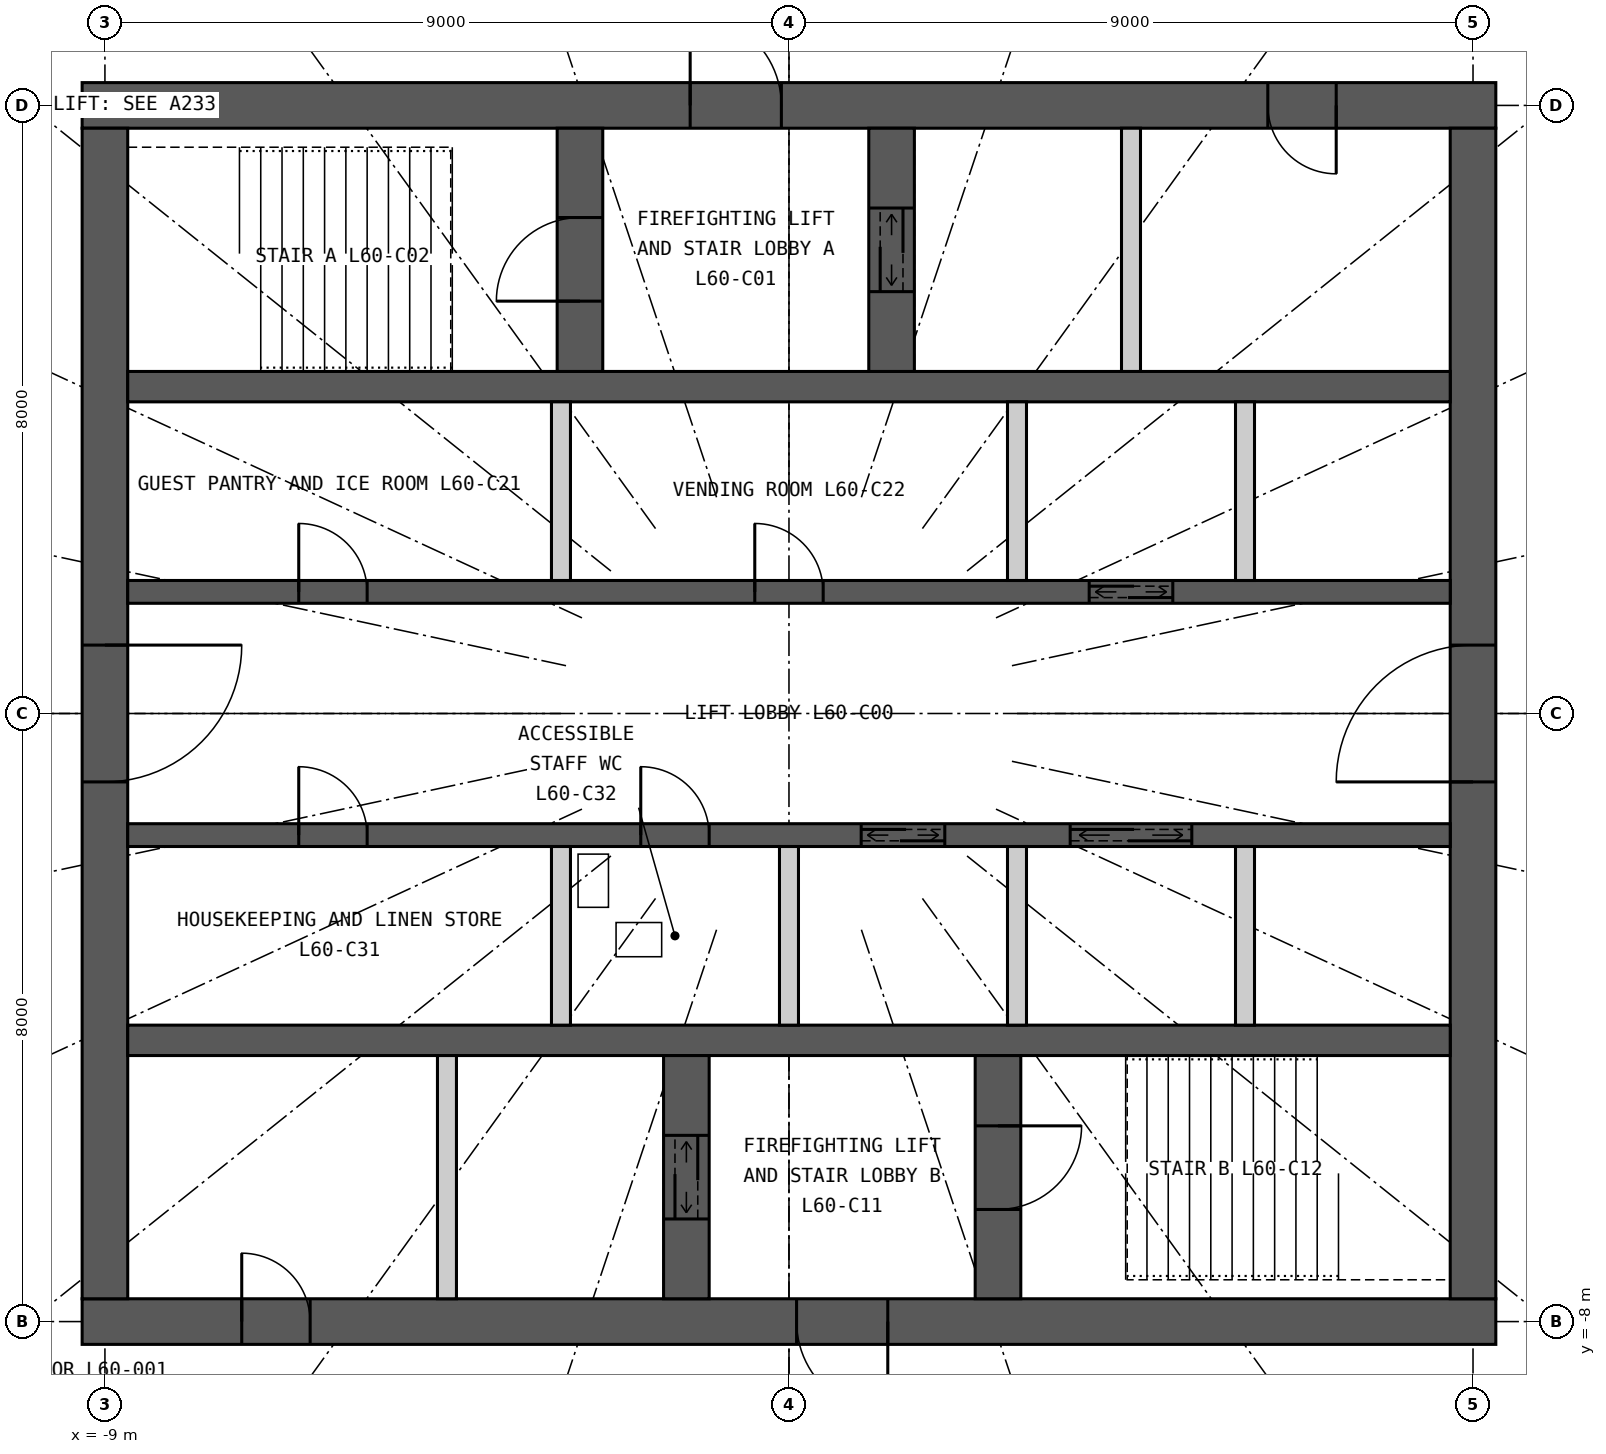
"""IFC4 building model, lengths in metres.
Left out: names, types, materials, properties, quantities, classifications, styles, units other than length and angle.
Written with IfcOpenShell. Run it as: python <this file> out.ifc"""

import sys

from ifc_helpers import new_model, si_unit, direction, frame, frame_2d, origin, place, context, subcontext, project, spatial, rectangle, extrude, element, fill, save


model = new_model("IFC4")
c1 = context("Model", 3, precision=1e-05, world=origin(), true_north=direction((0.0, 1.0)))
c2 = subcontext(c1, "Body", "Model", "MODEL_VIEW")
j1 = project(units=[si_unit("LENGTHUNIT", "METRE"), si_unit("PLANEANGLEUNIT", "RADIAN")], contexts=[c1])
p1 = place(None, origin())
s1 = spatial("IfcSite", under=j1, at=p1, CompositionType="ELEMENT")
p2 = place(p1, origin())
s2 = spatial("IfcBuilding", under=s1, at=p2, CompositionType="ELEMENT")
p3 = place(p2, frame((0.0, 0.0, 222.6)))
s3 = spatial("IfcBuildingStorey", under=s2, at=p3, CompositionType="ELEMENT", Elevation=222.6)
p4 = place(p3, frame((-9.3, 8.0, 0.0), z_axis=(0.0, 0.0, 1.0), x_axis=(1.0, 0.0, 0.0)))
e1 = element("IfcWall", 1, at=p4, inside=s3, PredefinedType="SHEAR", context=c2, shape_type="SweptSolid", body=[
    extrude(rectangle(XDim=18.6, YDim=0.6, at=frame_2d((9.3, 0.0))), origin(), (0.0, 0.0, 1.0), 3.3),
])
p5 = place(p4, frame((8.0, 0.0, 0.0)))
e2 = element("IfcOpeningElement", 2, at=p5, cuts=e1, PredefinedType="OPENING", context=c2, shape_type="SweptSolid", body=[
    extrude(rectangle(XDim=1.2, YDim=2.2, at=frame_2d((0.6, 1.1))), frame((0.0, 0.31, 0.0), z_axis=(0.0, -1.0, 0.0), x_axis=(1.0, 0.0, 0.0)), (0.0, 0.0, 1.0), 0.62),
])
p6 = place(p4, frame((15.6, 0.0, 0.0)))
e3 = element("IfcOpeningElement", 3, at=p6, cuts=e1, PredefinedType="OPENING", context=c2, shape_type="SweptSolid", body=[
    extrude(rectangle(XDim=0.9, YDim=2.2, at=frame_2d((0.45, 1.1))), frame((0.0, 0.31, 0.0), z_axis=(0.0, -1.0, 0.0), x_axis=(1.0, 0.0, 0.0)), (0.0, 0.0, 1.0), 0.62),
])
p7 = place(p3, frame((9.3, -8.0, 0.0), z_axis=(0.0, 0.0, 1.0), x_axis=(-1.0, 0.0, 0.0)))
e4 = element("IfcWall", 4, at=p7, inside=s3, PredefinedType="SHEAR", context=c2, shape_type="SweptSolid", body=[
    extrude(rectangle(XDim=18.6, YDim=0.6, at=frame_2d((9.3, 0.0))), origin(), (0.0, 0.0, 1.0), 3.3),
])
p8 = place(p7, frame((8.0, 0.0, 0.0)))
e5 = element("IfcOpeningElement", 5, at=p8, cuts=e4, PredefinedType="OPENING", context=c2, shape_type="SweptSolid", body=[
    extrude(rectangle(XDim=1.2, YDim=2.2, at=frame_2d((0.6, 1.1))), frame((0.0, 0.31, 0.0), z_axis=(0.0, -1.0, 0.0), x_axis=(1.0, 0.0, 0.0)), (0.0, 0.0, 1.0), 0.62),
])
p9 = place(p7, frame((15.6, 0.0, 0.0)))
e6 = element("IfcOpeningElement", 6, at=p9, cuts=e4, PredefinedType="OPENING", context=c2, shape_type="SweptSolid", body=[
    extrude(rectangle(XDim=0.9, YDim=2.2, at=frame_2d((0.45, 1.1))), frame((0.0, 0.31, 0.0), z_axis=(0.0, -1.0, 0.0), x_axis=(1.0, 0.0, 0.0)), (0.0, 0.0, 1.0), 0.62),
])
p10 = place(p3, frame((9.0, -7.7, 0.0), z_axis=(0.0, 0.0, 1.0), x_axis=(0.0, 1.0, 0.0)))
e7 = element("IfcWall", 7, at=p10, inside=s3, PredefinedType="SHEAR", context=c2, shape_type="SweptSolid", body=[
    extrude(rectangle(XDim=15.4, YDim=0.6, at=frame_2d((7.7, 0.0))), origin(), (0.0, 0.0, 1.0), 3.3),
])
p11 = place(p10, frame((6.8, 0.0, 0.0)))
e8 = element("IfcOpeningElement", 8, at=p11, cuts=e7, PredefinedType="OPENING", context=c2, shape_type="SweptSolid", body=[
    extrude(rectangle(XDim=1.8, YDim=2.2, at=frame_2d((0.9, 1.1))), frame((0.0, 0.31, 0.0), z_axis=(0.0, -1.0, 0.0), x_axis=(1.0, 0.0, 0.0)), (0.0, 0.0, 1.0), 0.62),
])
p12 = place(p3, frame((-9.0, 7.7, 0.0), z_axis=(0.0, 0.0, 1.0), x_axis=(0.0, -1.0, 0.0)))
e9 = element("IfcWall", 9, at=p12, inside=s3, PredefinedType="SHEAR", context=c2, shape_type="SweptSolid", body=[
    extrude(rectangle(XDim=15.4, YDim=0.6, at=frame_2d((7.7, 0.0))), origin(), (0.0, 0.0, 1.0), 3.3),
])
p13 = place(p12, frame((6.8, 0.0, 0.0)))
e10 = element("IfcOpeningElement", 10, at=p13, cuts=e9, PredefinedType="OPENING", context=c2, shape_type="SweptSolid", body=[
    extrude(rectangle(XDim=1.8, YDim=2.2, at=frame_2d((0.9, 1.1))), frame((0.0, 0.31, 0.0), z_axis=(0.0, -1.0, 0.0), x_axis=(1.0, 0.0, 0.0)), (0.0, 0.0, 1.0), 0.62),
])
p14 = place(p3, frame((-8.7, 4.3, 0.0), z_axis=(0.0, 0.0, 1.0), x_axis=(1.0, 0.0, 0.0)))
e11 = element("IfcWall", 11, at=p14, inside=s3, PredefinedType="SHEAR", context=c2, shape_type="SweptSolid", body=[
    extrude(rectangle(XDim=17.4, YDim=0.4, at=frame_2d((8.7, 0.0))), origin(), (0.0, 0.0, 1.0), 3.3),
])
p15 = place(p3, frame((-8.7, 1.6, 0.0), z_axis=(0.0, 0.0, 1.0), x_axis=(1.0, 0.0, 0.0)))
e12 = element("IfcWall", 12, at=p15, inside=s3, PredefinedType="SHEAR", context=c2, shape_type="SweptSolid", body=[
    extrude(rectangle(XDim=17.4, YDim=0.3, at=frame_2d((8.7, 0.0))), origin(), (0.0, 0.0, 1.0), 3.3),
])
p16 = place(p15, frame((12.65, 0.0, 0.0)))
e13 = element("IfcOpeningElement", 13, at=p16, cuts=e12, PredefinedType="OPENING", context=c2, shape_type="SweptSolid", body=[
    extrude(rectangle(XDim=1.1, YDim=2.2, at=frame_2d((0.55, 1.1))), frame((0.0, 0.16, 0.0), z_axis=(0.0, -1.0, 0.0), x_axis=(1.0, 0.0, 0.0)), (0.0, 0.0, 1.0), 0.32),
])
p17 = place(p15, frame((2.25, 0.0, 0.0)))
e14 = element("IfcOpeningElement", 14, at=p17, cuts=e12, PredefinedType="OPENING", context=c2, shape_type="SweptSolid", body=[
    extrude(rectangle(XDim=0.9, YDim=2.2, at=frame_2d((0.45, 1.1))), frame((0.0, 0.16, 0.0), z_axis=(0.0, -1.0, 0.0), x_axis=(1.0, 0.0, 0.0)), (0.0, 0.0, 1.0), 0.32),
])
p18 = place(p15, frame((8.25, 0.0, 0.0)))
e15 = element("IfcOpeningElement", 15, at=p18, cuts=e12, PredefinedType="OPENING", context=c2, shape_type="SweptSolid", body=[
    extrude(rectangle(XDim=0.9, YDim=2.2, at=frame_2d((0.45, 1.1))), frame((0.0, 0.16, 0.0), z_axis=(0.0, -1.0, 0.0), x_axis=(1.0, 0.0, 0.0)), (0.0, 0.0, 1.0), 0.32),
])
p19 = place(p3, frame((-8.7, -4.3, 0.0), z_axis=(0.0, 0.0, 1.0), x_axis=(1.0, 0.0, 0.0)))
e16 = element("IfcWall", 16, at=p19, inside=s3, PredefinedType="SHEAR", context=c2, shape_type="SweptSolid", body=[
    extrude(rectangle(XDim=17.4, YDim=0.4, at=frame_2d((8.7, 0.0))), origin(), (0.0, 0.0, 1.0), 3.3),
])
p20 = place(p3, frame((-8.7, -1.6, 0.0), z_axis=(0.0, 0.0, 1.0), x_axis=(1.0, 0.0, 0.0)))
e17 = element("IfcWall", 17, at=p20, inside=s3, PredefinedType="SHEAR", context=c2, shape_type="SweptSolid", body=[
    extrude(rectangle(XDim=17.4, YDim=0.3, at=frame_2d((8.7, 0.0))), origin(), (0.0, 0.0, 1.0), 3.3),
])
p21 = place(p20, frame((9.65, 0.0, 0.0)))
e18 = element("IfcOpeningElement", 18, at=p21, cuts=e17, PredefinedType="OPENING", context=c2, shape_type="SweptSolid", body=[
    extrude(rectangle(XDim=1.1, YDim=2.2, at=frame_2d((0.55, 1.1))), frame((0.0, 0.16, 0.0), z_axis=(0.0, -1.0, 0.0), x_axis=(1.0, 0.0, 0.0)), (0.0, 0.0, 1.0), 0.32),
])
p22 = place(p20, frame((12.4, 0.0, 0.0)))
e19 = element("IfcOpeningElement", 19, at=p22, cuts=e17, PredefinedType="OPENING", context=c2, shape_type="SweptSolid", body=[
    extrude(rectangle(XDim=1.6, YDim=2.4, at=frame_2d((0.8, 1.2))), frame((0.0, 0.16, 0.0), z_axis=(0.0, -1.0, 0.0), x_axis=(1.0, 0.0, 0.0)), (0.0, 0.0, 1.0), 0.32),
])
p23 = place(p20, frame((2.25, 0.0, 0.0)))
e20 = element("IfcOpeningElement", 20, at=p23, cuts=e17, PredefinedType="OPENING", context=c2, shape_type="SweptSolid", body=[
    extrude(rectangle(XDim=0.9, YDim=2.2, at=frame_2d((0.45, 1.1))), frame((0.0, 0.16, 0.0), z_axis=(0.0, -1.0, 0.0), x_axis=(1.0, 0.0, 0.0)), (0.0, 0.0, 1.0), 0.32),
])
p24 = place(p20, frame((6.75, 0.0, 0.0)))
e21 = element("IfcOpeningElement", 21, at=p24, cuts=e17, PredefinedType="OPENING", context=c2, shape_type="SweptSolid", body=[
    extrude(rectangle(XDim=0.9, YDim=2.2, at=frame_2d((0.45, 1.1))), frame((0.0, 0.16, 0.0), z_axis=(0.0, -1.0, 0.0), x_axis=(1.0, 0.0, 0.0)), (0.0, 0.0, 1.0), 0.32),
])
p25 = place(p3, frame((-2.75, 4.5, 0.0), z_axis=(0.0, 0.0, 1.0), x_axis=(0.0, 1.0, 0.0)))
e22 = element("IfcWall", 22, at=p25, inside=s3, PredefinedType="SHEAR", context=c2, shape_type="SweptSolid", body=[
    extrude(rectangle(XDim=3.2, YDim=0.6, at=frame_2d((1.6, 0.0))), origin(), (0.0, 0.0, 1.0), 3.3),
])
p26 = place(p25, frame((0.925, 0.0, 0.0)))
e23 = element("IfcOpeningElement", 23, at=p26, cuts=e22, PredefinedType="OPENING", context=c2, shape_type="SweptSolid", body=[
    extrude(rectangle(XDim=1.1, YDim=2.2, at=frame_2d((0.55, 1.1))), frame((0.0, 0.31, 0.0), z_axis=(0.0, -1.0, 0.0), x_axis=(1.0, 0.0, 0.0)), (0.0, 0.0, 1.0), 0.62),
])
p27 = place(p3, frame((1.35, 4.5, 0.0), z_axis=(0.0, 0.0, 1.0), x_axis=(0.0, 1.0, 0.0)))
e24 = element("IfcWall", 24, at=p27, inside=s3, PredefinedType="SHEAR", context=c2, shape_type="SweptSolid", body=[
    extrude(rectangle(XDim=3.2, YDim=0.6, at=frame_2d((1.6, 0.0))), origin(), (0.0, 0.0, 1.0), 3.3),
])
p28 = place(p27, frame((1.05, 0.0, 0.0)))
e25 = element("IfcOpeningElement", 25, at=p28, cuts=e24, PredefinedType="OPENING", context=c2, shape_type="SweptSolid", body=[
    extrude(rectangle(XDim=1.1, YDim=2.2, at=frame_2d((0.55, 1.1))), frame((0.0, 0.31, 0.0), z_axis=(0.0, -1.0, 0.0), x_axis=(1.0, 0.0, 0.0)), (0.0, 0.0, 1.0), 0.62),
])
p29 = place(p3, frame((4.5, 4.5, 0.0), z_axis=(0.0, 0.0, 1.0), x_axis=(0.0, 1.0, 0.0)))
e26 = element("IfcWall", 26, at=p29, inside=s3, PredefinedType="PARTITIONING", context=c2, shape_type="SweptSolid", body=[
    extrude(rectangle(XDim=3.2, YDim=0.25, at=frame_2d((1.6, 0.0))), origin(), (0.0, 0.0, 1.0), 3.3),
])
p30 = place(p3, frame((2.75, -7.7, 0.0), z_axis=(0.0, 0.0, 1.0), x_axis=(0.0, 1.0, 0.0)))
e27 = element("IfcWall", 27, at=p30, inside=s3, PredefinedType="SHEAR", context=c2, shape_type="SweptSolid", body=[
    extrude(rectangle(XDim=3.2, YDim=0.6, at=frame_2d((1.6, 0.0))), origin(), (0.0, 0.0, 1.0), 3.3),
])
p31 = place(p30, frame((1.175, 0.0, 0.0)))
e28 = element("IfcOpeningElement", 28, at=p31, cuts=e27, PredefinedType="OPENING", context=c2, shape_type="SweptSolid", body=[
    extrude(rectangle(XDim=1.1, YDim=2.2, at=frame_2d((0.55, 1.1))), frame((0.0, 0.31, 0.0), z_axis=(0.0, -1.0, 0.0), x_axis=(1.0, 0.0, 0.0)), (0.0, 0.0, 1.0), 0.62),
])
p32 = place(p3, frame((-1.35, -7.7, 0.0), z_axis=(0.0, 0.0, 1.0), x_axis=(0.0, 1.0, 0.0)))
e29 = element("IfcWall", 29, at=p32, inside=s3, PredefinedType="SHEAR", context=c2, shape_type="SweptSolid", body=[
    extrude(rectangle(XDim=3.2, YDim=0.6, at=frame_2d((1.6, 0.0))), origin(), (0.0, 0.0, 1.0), 3.3),
])
p33 = place(p32, frame((1.05, 0.0, 0.0)))
e30 = element("IfcOpeningElement", 30, at=p33, cuts=e29, PredefinedType="OPENING", context=c2, shape_type="SweptSolid", body=[
    extrude(rectangle(XDim=1.1, YDim=2.2, at=frame_2d((0.55, 1.1))), frame((0.0, 0.31, 0.0), z_axis=(0.0, -1.0, 0.0), x_axis=(1.0, 0.0, 0.0)), (0.0, 0.0, 1.0), 0.62),
])
p34 = place(p3, frame((-4.5, -7.7, 0.0), z_axis=(0.0, 0.0, 1.0), x_axis=(0.0, 1.0, 0.0)))
e31 = element("IfcWall", 31, at=p34, inside=s3, PredefinedType="PARTITIONING", context=c2, shape_type="SweptSolid", body=[
    extrude(rectangle(XDim=3.2, YDim=0.25, at=frame_2d((1.6, 0.0))), origin(), (0.0, 0.0, 1.0), 3.3),
])
for number, where, z_axis, x_axis in (
    (32, (-3.0, 1.75, 0.0), (0.0, 0.0, 1.0), (0.0, 1.0, 0.0)),
    (33, (3.0, 1.75, 0.0), (0.0, 0.0, 1.0), (0.0, 1.0, 0.0)),
    (34, (6.0, 1.75, 0.0), (0.0, 0.0, 1.0), (0.0, 1.0, 0.0)),
    (35, (-3.0, -4.1, 0.0), (0.0, 0.0, 1.0), (0.0, 1.0, 0.0)),
    (36, (0.0, -4.1, 0.0), (0.0, 0.0, 1.0), (0.0, 1.0, 0.0)),
    (37, (3.0, -4.1, 0.0), (0.0, 0.0, 1.0), (0.0, 1.0, 0.0)),
    (38, (6.0, -4.1, 0.0), (0.0, 0.0, 1.0), (0.0, 1.0, 0.0)),
):
    element("IfcWall", number, at=place(p3, frame(where, z_axis=z_axis, x_axis=x_axis)), inside=s3, PredefinedType="PARTITIONING", context=c2, shape_type="SweptSolid", body=[
        extrude(rectangle(XDim=2.35, YDim=0.25, at=frame_2d((1.175, 0.0))), origin(), (0.0, 0.0, 1.0), 3.3),
    ])
p35 = place(p5, origin())
e39 = element("IfcDoor", 39, at=p35, inside=s3, OperationType="SINGLE_SWING_LEFT", PredefinedType="DOOR", context=c2, shape_type="SweptSolid", body=[
    extrude(rectangle(XDim=1.2, YDim=2.2, at=frame_2d((0.6, 1.1))), frame((0.0, 0.025, 0.0), z_axis=(0.0, -1.0, 0.0), x_axis=(1.0, 0.0, 0.0)), (0.0, 0.0, 1.0), 0.05),
])
fill(e2, e39)
p36 = place(p26, origin())
e40 = element("IfcDoor", 40, at=p36, inside=s3, OperationType="SINGLE_SWING_LEFT", PredefinedType="DOOR", context=c2, shape_type="SweptSolid", body=[
    extrude(rectangle(XDim=1.1, YDim=2.2, at=frame_2d((0.55, 1.1))), frame((0.0, 0.025, 0.0), z_axis=(0.0, -1.0, 0.0), x_axis=(1.0, 0.0, 0.0)), (0.0, 0.0, 1.0), 0.05),
])
fill(e23, e40)
p37 = place(p28, origin())
e41 = element("IfcDoor", 41, at=p37, inside=s3, OperationType="DOUBLE_DOOR_SLIDING", PredefinedType="DOOR", context=c2, shape_type="SweptSolid", body=[
    extrude(rectangle(XDim=1.1, YDim=2.2, at=frame_2d((0.55, 1.1))), frame((0.0, 0.025, 0.0), z_axis=(0.0, -1.0, 0.0), x_axis=(1.0, 0.0, 0.0)), (0.0, 0.0, 1.0), 0.05),
])
fill(e25, e41)
p38 = place(p6, origin())
e42 = element("IfcDoor", 42, at=p38, inside=s3, OperationType="SINGLE_SWING_RIGHT", PredefinedType="DOOR", context=c2, shape_type="SweptSolid", body=[
    extrude(rectangle(XDim=0.9, YDim=2.2, at=frame_2d((0.45, 1.1))), frame((0.0, 0.025, 0.0), z_axis=(0.0, -1.0, 0.0), x_axis=(1.0, 0.0, 0.0)), (0.0, 0.0, 1.0), 0.05),
])
fill(e3, e42)
p39 = place(p8, origin())
e43 = element("IfcDoor", 43, at=p39, inside=s3, OperationType="SINGLE_SWING_LEFT", PredefinedType="DOOR", context=c2, shape_type="SweptSolid", body=[
    extrude(rectangle(XDim=1.2, YDim=2.2, at=frame_2d((0.6, 1.1))), frame((0.0, 0.025, 0.0), z_axis=(0.0, -1.0, 0.0), x_axis=(1.0, 0.0, 0.0)), (0.0, 0.0, 1.0), 0.05),
])
fill(e5, e43)
p40 = place(p31, origin())
e44 = element("IfcDoor", 44, at=p40, inside=s3, OperationType="SINGLE_SWING_RIGHT", PredefinedType="DOOR", context=c2, shape_type="SweptSolid", body=[
    extrude(rectangle(XDim=1.1, YDim=2.2, at=frame_2d((0.55, 1.1))), frame((0.0, 0.025, 0.0), z_axis=(0.0, -1.0, 0.0), x_axis=(1.0, 0.0, 0.0)), (0.0, 0.0, 1.0), 0.05),
])
fill(e28, e44)
p41 = place(p33, origin())
e45 = element("IfcDoor", 45, at=p41, inside=s3, OperationType="DOUBLE_DOOR_SLIDING", PredefinedType="DOOR", context=c2, shape_type="SweptSolid", body=[
    extrude(rectangle(XDim=1.1, YDim=2.2, at=frame_2d((0.55, 1.1))), frame((0.0, 0.025, 0.0), z_axis=(0.0, -1.0, 0.0), x_axis=(1.0, 0.0, 0.0)), (0.0, 0.0, 1.0), 0.05),
])
fill(e30, e45)
p42 = place(p9, origin())
e46 = element("IfcDoor", 46, at=p42, inside=s3, OperationType="SINGLE_SWING_RIGHT", PredefinedType="DOOR", context=c2, shape_type="SweptSolid", body=[
    extrude(rectangle(XDim=0.9, YDim=2.2, at=frame_2d((0.45, 1.1))), frame((0.0, 0.025, 0.0), z_axis=(0.0, -1.0, 0.0), x_axis=(1.0, 0.0, 0.0)), (0.0, 0.0, 1.0), 0.05),
])
fill(e6, e46)
p43 = place(p16, origin())
e47 = element("IfcDoor", 47, at=p43, inside=s3, OperationType="DOUBLE_DOOR_SLIDING", PredefinedType="DOOR", context=c2, shape_type="SweptSolid", body=[
    extrude(rectangle(XDim=1.1, YDim=2.2, at=frame_2d((0.55, 1.1))), frame((0.0, 0.025, 0.0), z_axis=(0.0, -1.0, 0.0), x_axis=(1.0, 0.0, 0.0)), (0.0, 0.0, 1.0), 0.05),
])
fill(e13, e47)
p44 = place(p21, origin())
e48 = element("IfcDoor", 48, at=p44, inside=s3, OperationType="DOUBLE_DOOR_SLIDING", PredefinedType="DOOR", context=c2, shape_type="SweptSolid", body=[
    extrude(rectangle(XDim=1.1, YDim=2.2, at=frame_2d((0.55, 1.1))), frame((0.0, 0.025, 0.0), z_axis=(0.0, -1.0, 0.0), x_axis=(1.0, 0.0, 0.0)), (0.0, 0.0, 1.0), 0.05),
])
fill(e18, e48)
p45 = place(p22, origin())
e49 = element("IfcDoor", 49, at=p45, inside=s3, OperationType="DOUBLE_DOOR_SLIDING", PredefinedType="DOOR", context=c2, shape_type="SweptSolid", body=[
    extrude(rectangle(XDim=1.6, YDim=2.4, at=frame_2d((0.8, 1.2))), frame((0.0, 0.025, 0.0), z_axis=(0.0, -1.0, 0.0), x_axis=(1.0, 0.0, 0.0)), (0.0, 0.0, 1.0), 0.05),
])
fill(e19, e49)
p46 = place(p17, origin())
e50 = element("IfcDoor", 50, at=p46, inside=s3, OperationType="SINGLE_SWING_LEFT", PredefinedType="DOOR", context=c2, shape_type="SweptSolid", body=[
    extrude(rectangle(XDim=0.9, YDim=2.2, at=frame_2d((0.45, 1.1))), frame((0.0, 0.025, 0.0), z_axis=(0.0, -1.0, 0.0), x_axis=(1.0, 0.0, 0.0)), (0.0, 0.0, 1.0), 0.05),
])
fill(e14, e50)
p47 = place(p18, origin())
e51 = element("IfcDoor", 51, at=p47, inside=s3, OperationType="SINGLE_SWING_LEFT", PredefinedType="DOOR", context=c2, shape_type="SweptSolid", body=[
    extrude(rectangle(XDim=0.9, YDim=2.2, at=frame_2d((0.45, 1.1))), frame((0.0, 0.025, 0.0), z_axis=(0.0, -1.0, 0.0), x_axis=(1.0, 0.0, 0.0)), (0.0, 0.0, 1.0), 0.05),
])
fill(e15, e51)
p48 = place(p23, origin())
e52 = element("IfcDoor", 52, at=p48, inside=s3, OperationType="SINGLE_SWING_LEFT", PredefinedType="DOOR", context=c2, shape_type="SweptSolid", body=[
    extrude(rectangle(XDim=0.9, YDim=2.2, at=frame_2d((0.45, 1.1))), frame((0.0, 0.025, 0.0), z_axis=(0.0, -1.0, 0.0), x_axis=(1.0, 0.0, 0.0)), (0.0, 0.0, 1.0), 0.05),
])
fill(e20, e52)
p49 = place(p24, origin())
e53 = element("IfcDoor", 53, at=p49, inside=s3, OperationType="SINGLE_SWING_LEFT", PredefinedType="DOOR", context=c2, shape_type="SweptSolid", body=[
    extrude(rectangle(XDim=0.9, YDim=2.2, at=frame_2d((0.45, 1.1))), frame((0.0, 0.025, 0.0), z_axis=(0.0, -1.0, 0.0), x_axis=(1.0, 0.0, 0.0)), (0.0, 0.0, 1.0), 0.05),
])
fill(e21, e53)
p50 = place(p11, origin())
e54 = element("IfcDoor", 54, at=p50, inside=s3, OperationType="DOUBLE_DOOR_DOUBLE_SWING", PredefinedType="DOOR", context=c2, shape_type="SweptSolid", body=[
    extrude(rectangle(XDim=1.8, YDim=2.2, at=frame_2d((0.9, 1.1))), frame((0.0, 0.025, 0.0), z_axis=(0.0, -1.0, 0.0), x_axis=(1.0, 0.0, 0.0)), (0.0, 0.0, 1.0), 0.05),
])
fill(e8, e54)
p51 = place(p13, origin())
e55 = element("IfcDoor", 55, at=p51, inside=s3, OperationType="DOUBLE_DOOR_DOUBLE_SWING", PredefinedType="DOOR", context=c2, shape_type="SweptSolid", body=[
    extrude(rectangle(XDim=1.8, YDim=2.2, at=frame_2d((0.9, 1.1))), frame((0.0, 0.025, 0.0), z_axis=(0.0, -1.0, 0.0), x_axis=(1.0, 0.0, 0.0)), (0.0, 0.0, 1.0), 0.05),
])
fill(e10, e55)
save(model, sys.argv[1])
